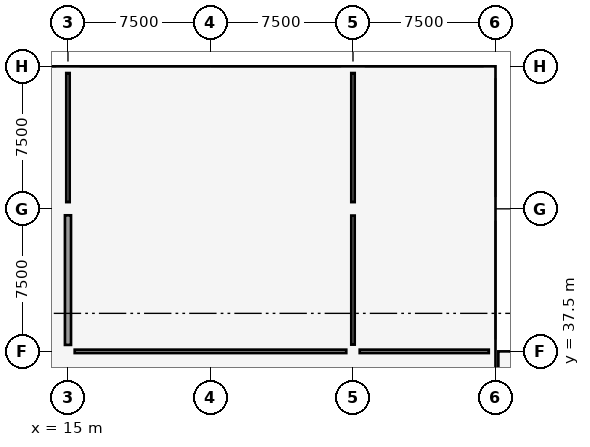
"""IFC4 building model, lengths in metres.
Left out: names, types, materials, properties, quantities, classifications, styles, units other than length and angle.
Written with IfcOpenShell. Run it as: python <this file> out.ifc"""

import sys

from ifc_helpers import new_model, si_unit, direction, frame, frame_2d, origin, origin_2d, place, context, subcontext, project, spatial, rectangle, extrude, element, fill, save


model = new_model("IFC4")
c1 = context("Model", 3, precision=1e-05, world=origin(), true_north=direction((0.0, 1.0)))
c2 = subcontext(c1, "Body", "Model", "MODEL_VIEW")
j1 = project(units=[si_unit("LENGTHUNIT", "METRE"), si_unit("PLANEANGLEUNIT", "RADIAN")], contexts=[c1])
p1 = place(None, origin())
s1 = spatial("IfcSite", under=j1, at=p1, CompositionType="ELEMENT")
p2 = place(p1, origin())
s2 = spatial("IfcBuilding", under=s1, at=p2, CompositionType="ELEMENT")
p3 = place(p2, frame((0.0, 0.0, 4.8)))
s3 = spatial("IfcBuildingStorey", under=s2, at=p3, CompositionType="ELEMENT", Elevation=4.8)
for number, where, z_axis, x_axis in (
    (1, (15.0, 37.5, 0.0), (0.0, 0.0, 1.0), (1.0, 0.0, 0.0)),
    (2, (15.0, 45.0, 0.0), (0.0, 0.0, 1.0), (1.0, 0.0, 0.0)),
    (3, (15.0, 52.5, 0.0), (0.0, 0.0, 1.0), (1.0, 0.0, 0.0)),
    (4, (30.0, 37.5, 0.0), (0.0, 0.0, 1.0), (1.0, 0.0, 0.0)),
    (5, (30.0, 45.0, 0.0), (0.0, 0.0, 1.0), (1.0, 0.0, 0.0)),
    (6, (30.0, 52.5, 0.0), (0.0, 0.0, 1.0), (1.0, 0.0, 0.0)),
    (7, (37.5, 37.5, 0.0), (0.0, 0.0, 1.0), (1.0, 0.0, 0.0)),
    (8, (37.5, 45.0, 0.0), (0.0, 0.0, 1.0), (1.0, 0.0, 0.0)),
    (9, (37.5, 52.5, 0.0), (0.0, 0.0, 1.0), (1.0, 0.0, 0.0)),
):
    element("IfcColumn", number, at=place(p3, frame(where, z_axis=z_axis, x_axis=x_axis)), inside=s3, PredefinedType="COLUMN", context=c2, shape_type="SweptSolid", body=[
        extrude(rectangle(XDim=0.68, YDim=0.68, at=origin_2d()), origin(), (0.0, 0.0, 1.0), 4.2),
    ])
p4 = place(p3, frame((15.0, 37.84, 0.0), z_axis=(0.0, 0.0, 1.0), x_axis=(0.0, 1.0, 0.0)))
e10 = element("IfcWall", 10, at=p4, inside=s3, PredefinedType="SHEAR", context=c2, shape_type="SweptSolid", body=[
    extrude(rectangle(XDim=6.82, YDim=0.32, at=frame_2d((3.41, 0.0))), origin(), (0.0, 0.0, 1.0), 3.9),
])
p5 = place(p3, frame((15.354, 37.5, 0.0), z_axis=(0.0, 0.0, 1.0), x_axis=(1.0, 0.0, 0.0)))
e11 = element("IfcWall", 11, at=p5, inside=s3, PredefinedType="PARTITIONING", context=c2, shape_type="SweptSolid", body=[
    extrude(rectangle(XDim=14.292, YDim=0.18, at=frame_2d((7.146, 0.0))), origin(), (0.0, 0.0, 1.0), 2.89),
])
p6 = place(p3, frame((30.354, 37.5, 0.0), z_axis=(0.0, 0.0, 1.0), x_axis=(1.0, 0.0, 0.0)))
e12 = element("IfcWall", 12, at=p6, inside=s3, PredefinedType="PARTITIONING", context=c2, shape_type="SweptSolid", body=[
    extrude(rectangle(XDim=6.792, YDim=0.18, at=frame_2d((3.396, 0.0))), origin(), (0.0, 0.0, 1.0), 2.89),
])
p7 = place(p6, frame((2.646, 0.0, 0.0)))
e13 = element("IfcOpeningElement", 13, at=p7, cuts=e12, PredefinedType="OPENING", context=c2, shape_type="SweptSolid", body=[
    extrude(rectangle(XDim=1.5, YDim=2.16, at=frame_2d((0.75, 1.08))), frame((0.0, 0.1, 0.0), z_axis=(0.0, -1.0, 0.0), x_axis=(1.0, 0.0, 0.0)), (0.0, 0.0, 1.0), 0.2),
])
for number, where, z_axis, x_axis in (
    (14, (30.0, 37.854, 0.0), (0.0, 0.0, 1.0), (0.0, 1.0, 0.0)),
    (15, (30.0, 45.354, 0.0), (0.0, 0.0, 1.0), (0.0, 1.0, 0.0)),
):
    element("IfcWall", number, at=place(p3, frame(where, z_axis=z_axis, x_axis=x_axis)), inside=s3, PredefinedType="PARTITIONING", context=c2, shape_type="SweptSolid", body=[
        extrude(rectangle(XDim=6.792, YDim=0.18, at=frame_2d((3.396, 0.0))), origin(), (0.0, 0.0, 1.0), 2.89),
    ])
p8 = place(p3, frame((15.0, 45.354, 0.0), z_axis=(0.0, 0.0, 1.0), x_axis=(0.0, 1.0, 0.0)))
e16 = element("IfcWall", 16, at=p8, inside=s3, PredefinedType="PARTITIONING", context=c2, shape_type="SweptSolid", body=[
    extrude(rectangle(XDim=6.792, YDim=0.18, at=frame_2d((3.396, 0.0))), origin(), (0.0, 0.0, 1.0), 2.89),
])
p9 = place(p8, frame((2.646, 0.0, 0.0)))
e17 = element("IfcOpeningElement", 17, at=p9, cuts=e16, PredefinedType="OPENING", context=c2, shape_type="SweptSolid", body=[
    extrude(rectangle(XDim=1.5, YDim=2.16, at=frame_2d((0.75, 1.08))), frame((0.0, 0.1, 0.0), z_axis=(0.0, -1.0, 0.0), x_axis=(1.0, 0.0, 0.0)), (0.0, 0.0, 1.0), 0.2),
])
p10 = place(p7, origin())
e18 = element("IfcDoor", 18, at=p10, inside=s3, OperationType="SINGLE_SWING_RIGHT", PredefinedType="DOOR", context=c2, shape_type="SweptSolid", body=[
    extrude(rectangle(XDim=1.5, YDim=2.16, at=frame_2d((0.75, 1.08))), frame((0.0, 0.025, 0.0), z_axis=(0.0, -1.0, 0.0), x_axis=(1.0, 0.0, 0.0)), (0.0, 0.0, 1.0), 0.05),
])
fill(e13, e18)
p11 = place(p9, origin())
e19 = element("IfcDoor", 19, at=p11, inside=s3, OperationType="SINGLE_SWING_LEFT", PredefinedType="DOOR", context=c2, shape_type="SweptSolid", body=[
    extrude(rectangle(XDim=1.5, YDim=2.16, at=frame_2d((0.75, 1.08))), frame((0.0, 0.025, 0.0), z_axis=(0.0, -1.0, 0.0), x_axis=(1.0, 0.0, 0.0)), (0.0, 0.0, 1.0), 0.05),
])
fill(e17, e19)
save(model, sys.argv[1])
